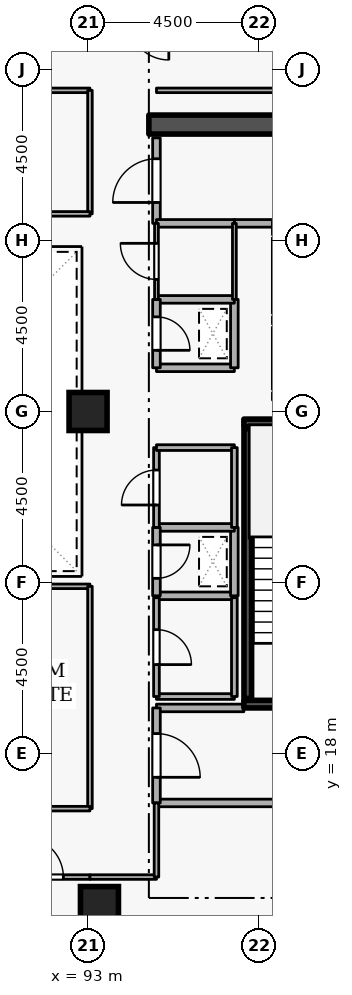
"""IFC4 building model, lengths in metres.
Left out: names, types, materials, properties, quantities, classifications, styles, units other than length and angle.
Written with IfcOpenShell. Run it as: python <this file> out.ifc"""

import sys

from ifc_helpers import new_model, si_unit, direction, frame, frame_2d, origin, origin_2d, place, context, subcontext, project, spatial, rectangle, extrude, element, fill, save


model = new_model("IFC4")
c1 = context("Model", 3, precision=1e-05, world=origin(), true_north=direction((0.0, 1.0)))
c2 = subcontext(c1, "Body", "Model", "MODEL_VIEW")
j1 = project(units=[si_unit("LENGTHUNIT", "METRE"), si_unit("PLANEANGLEUNIT", "RADIAN")], contexts=[c1])
p1 = place(None, origin())
s1 = spatial("IfcSite", under=j1, at=p1, CompositionType="ELEMENT")
p2 = place(p1, origin())
s2 = spatial("IfcBuilding", under=s1, at=p2, CompositionType="ELEMENT")
p3 = place(p2, frame((0.0, 0.0, 236.7)))
s3 = spatial("IfcBuildingStorey", under=s2, at=p3, CompositionType="ELEMENT", Elevation=236.7)
p4 = place(p3, frame((94.6, 34.55, 0.0), z_axis=(0.0, 0.0, 1.0), x_axis=(1.0, 0.0, 0.0)))
e1 = element("IfcWall", 1, at=p4, inside=s3, PredefinedType="SHEAR", context=c2, shape_type="SweptSolid", body=[
    extrude(rectangle(XDim=5.8, YDim=0.5, at=frame_2d((2.9, 0.0))), origin(), (0.0, 0.0, 1.0), 3.6),
])
for number, where, z_axis, x_axis in (
    (2, (93.3, 14.0, 0.0), (0.0, 0.0, 1.0), (1.0, 0.0, 0.0)),
    (3, (93.0, 27.0, 0.0), (0.0, 0.0, 1.0), (1.0, 0.0, 0.0)),
):
    element("IfcColumn", number, at=place(p3, frame(where, z_axis=z_axis, x_axis=x_axis)), inside=s3, PredefinedType="COLUMN", context=c2, shape_type="SweptSolid", body=[
        extrude(rectangle(XDim=1.0, YDim=1.0, at=origin_2d()), origin(), (0.0, 0.0, 1.0), 3.6),
    ])
p5 = place(p3, frame((97.95, 29.22, 0.0), z_axis=(0.0, 0.0, 1.0), x_axis=(0.0, -1.0, 0.0)))
e4 = element("IfcWall", 4, at=p5, inside=s3, PredefinedType="STANDARD", context=c2, shape_type="SweptSolid", body=[
    extrude(rectangle(XDim=1.64, YDim=0.2, at=frame_2d((0.82, 0.0))), origin(), (0.0, 0.0, 1.0), 3.34),
])
p6 = place(p5, frame((0.31, 0.0, 0.0)))
e5 = element("IfcOpeningElement", 5, at=p6, cuts=e4, PredefinedType="OPENING", context=c2, shape_type="SweptSolid", body=[
    extrude(rectangle(XDim=1.02, YDim=2.06, at=frame_2d((0.51, 1.03))), frame((0.0, 0.11, 0.0), z_axis=(0.0, -1.0, 0.0), x_axis=(1.0, 0.0, 0.0)), (0.0, 0.0, 1.0), 0.22),
])
p7 = place(p3, frame((97.95, 31.57, 0.0), z_axis=(0.0, 0.0, 1.0), x_axis=(0.0, -1.0, 0.0)))
e6 = element("IfcWall", 6, at=p7, inside=s3, PredefinedType="STANDARD", context=c2, shape_type="SweptSolid", body=[
    extrude(rectangle(XDim=1.99, YDim=0.2, at=frame_2d((0.995, 0.0))), origin(), (0.0, 0.0, 1.0), 3.34),
])
p8 = place(p7, frame((0.485, 0.0, 0.0)))
e7 = element("IfcOpeningElement", 7, at=p8, cuts=e6, PredefinedType="OPENING", context=c2, shape_type="SweptSolid", body=[
    extrude(rectangle(XDim=1.02, YDim=2.06, at=frame_2d((0.51, 1.03))), frame((0.0, 0.11, 0.0), z_axis=(0.0, -1.0, 0.0), x_axis=(1.0, 0.0, 0.0)), (0.0, 0.0, 1.0), 0.22),
])
p9 = place(p3, frame((100.45, 19.3, 0.0), z_axis=(0.0, 0.0, 1.0), x_axis=(-1.0, 0.0, 0.0)))
e8 = element("IfcWall", 8, at=p9, inside=s3, PredefinedType="SHEAR", context=c2, shape_type="SweptSolid", body=[
    extrude(rectangle(XDim=3.35, YDim=0.2, at=frame_2d((1.675, 0.0))), origin(), (0.0, 0.0, 1.0), 3.6),
])
p10 = place(p9, frame((1.125, 0.0, 0.0)))
e9 = element("IfcOpeningElement", 9, at=p10, cuts=e8, PredefinedType="OPENING", context=c2, shape_type="SweptSolid", body=[
    extrude(rectangle(XDim=1.1, YDim=2.1, at=frame_2d((0.55, 1.05))), frame((0.0, 0.11, 0.0), z_axis=(0.0, -1.0, 0.0), x_axis=(1.0, 0.0, 0.0)), (0.0, 0.0, 1.0), 0.22),
])
p11 = place(p3, frame((97.1, 26.7, 0.0), z_axis=(0.0, 0.0, 1.0), x_axis=(1.0, 0.0, 0.0)))
e10 = element("IfcWall", 10, at=p11, inside=s3, PredefinedType="SHEAR", context=c2, shape_type="SweptSolid", body=[
    extrude(rectangle(XDim=3.35, YDim=0.2, at=frame_2d((1.675, 0.0))), origin(), (0.0, 0.0, 1.0), 3.6),
])
p12 = place(p3, frame((97.203, 26.55, 0.0), z_axis=(0.0, 0.0, 1.0), x_axis=(0.0, -1.0, 0.0)))
e11 = element("IfcWall", 11, at=p12, inside=s3, PredefinedType="SHEAR", context=c2, shape_type="SweptSolid", body=[
    extrude(rectangle(XDim=7.1, YDim=0.2, at=frame_2d((3.55, 0.0))), origin(), (0.0, 0.0, 1.0), 3.6),
])
p13 = place(p3, frame((94.8, 16.7, 0.0), z_axis=(0.0, 0.0, 1.0), x_axis=(1.0, 0.0, 0.0)))
e12 = element("IfcWall", 12, at=p13, inside=s3, PredefinedType="STANDARD", context=c2, shape_type="SweptSolid", body=[
    extrude(rectangle(XDim=5.7, YDim=0.2, at=frame_2d((2.85, 0.0))), origin(), (0.0, 0.0, 1.0), 3.34),
])
p14 = place(p3, frame((97.1, 19.2, 0.0), z_axis=(0.0, 0.0, 1.0), x_axis=(-1.0, 0.0, 0.0)))
e13 = element("IfcWall", 13, at=p14, inside=s3, PredefinedType="STANDARD", context=c2, shape_type="SweptSolid", body=[
    extrude(rectangle(XDim=2.3, YDim=0.2, at=frame_2d((1.15, 0.0))), origin(), (0.0, 0.0, 1.0), 2.545),
])
p15 = place(p3, frame((94.8, 19.2, 0.0), z_axis=(0.0, 0.0, 1.0), x_axis=(0.0, -1.0, 0.0)))
e14 = element("IfcWall", 14, at=p15, inside=s3, PredefinedType="STANDARD", context=c2, shape_type="SweptSolid", body=[
    extrude(rectangle(XDim=2.5, YDim=0.2, at=frame_2d((1.25, 0.0))), origin(), (0.0, 0.0, 1.0), 3.34),
])
p16 = place(p15, frame((0.675, 0.0, 0.0)))
e15 = element("IfcOpeningElement", 15, at=p16, cuts=e14, PredefinedType="OPENING", context=c2, shape_type="SweptSolid", body=[
    extrude(rectangle(XDim=1.15, YDim=2.1, at=frame_2d((0.575, 1.05))), frame((0.0, 0.11, 0.0), z_axis=(0.0, -1.0, 0.0), x_axis=(1.0, 0.0, 0.0)), (0.0, 0.0, 1.0), 0.22),
])
p17 = place(p3, frame((94.8, 28.15, 0.0), z_axis=(0.0, 0.0, 1.0), x_axis=(1.0, 0.0, 0.0)))
e16 = element("IfcWall", 16, at=p17, inside=s3, PredefinedType="STANDARD", context=c2, shape_type="SweptSolid", body=[
    extrude(rectangle(XDim=2.05, YDim=0.2, at=frame_2d((1.025, 0.0))), origin(), (0.0, 0.0, 1.0), 3.34),
])
p18 = place(p3, frame((96.85, 28.15, 0.0), z_axis=(0.0, 0.0, 1.0), x_axis=(0.0, 1.0, 0.0)))
e17 = element("IfcWall", 17, at=p18, inside=s3, PredefinedType="STANDARD", context=c2, shape_type="SweptSolid", body=[
    extrude(rectangle(XDim=1.8, YDim=0.2, at=frame_2d((0.9, 0.0))), origin(), (0.0, 0.0, 1.0), 3.34),
])
p19 = place(p3, frame((96.85, 29.95, 0.0), z_axis=(0.0, 0.0, 1.0), x_axis=(-1.0, 0.0, 0.0)))
e18 = element("IfcWall", 18, at=p19, inside=s3, PredefinedType="STANDARD", context=c2, shape_type="SweptSolid", body=[
    extrude(rectangle(XDim=2.05, YDim=0.2, at=frame_2d((1.025, 0.0))), origin(), (0.0, 0.0, 1.0), 3.34),
])
p20 = place(p3, frame((94.8, 29.95, 0.0), z_axis=(0.0, 0.0, 1.0), x_axis=(0.0, -1.0, 0.0)))
e19 = element("IfcWall", 19, at=p20, inside=s3, PredefinedType="STANDARD", context=c2, shape_type="SweptSolid", body=[
    extrude(rectangle(XDim=1.8, YDim=0.2, at=frame_2d((0.9, 0.0))), origin(), (0.0, 0.0, 1.0), 3.34),
])
p21 = place(p20, frame((0.46, 0.0, 0.0)))
e20 = element("IfcOpeningElement", 20, at=p21, cuts=e19, PredefinedType="OPENING", context=c2, shape_type="SweptSolid", body=[
    extrude(rectangle(XDim=0.88, YDim=2.04, at=frame_2d((0.44, 1.02))), frame((0.0, 0.11, 0.0), z_axis=(0.0, -1.0, 0.0), x_axis=(1.0, 0.0, 0.0)), (0.0, 0.0, 1.0), 0.22),
])
p22 = place(p3, frame((94.8, 22.15, 0.0), z_axis=(0.0, 0.0, 1.0), x_axis=(1.0, 0.0, 0.0)))
e21 = element("IfcWall", 21, at=p22, inside=s3, PredefinedType="STANDARD", context=c2, shape_type="SweptSolid", body=[
    extrude(rectangle(XDim=2.05, YDim=0.2, at=frame_2d((1.025, 0.0))), origin(), (0.0, 0.0, 1.0), 3.34),
])
p23 = place(p3, frame((96.85, 22.15, 0.0), z_axis=(0.0, 0.0, 1.0), x_axis=(0.0, 1.0, 0.0)))
e22 = element("IfcWall", 22, at=p23, inside=s3, PredefinedType="STANDARD", context=c2, shape_type="SweptSolid", body=[
    extrude(rectangle(XDim=1.8, YDim=0.2, at=frame_2d((0.9, 0.0))), origin(), (0.0, 0.0, 1.0), 3.34),
])
p24 = place(p3, frame((96.85, 23.95, 0.0), z_axis=(0.0, 0.0, 1.0), x_axis=(-1.0, 0.0, 0.0)))
e23 = element("IfcWall", 23, at=p24, inside=s3, PredefinedType="STANDARD", context=c2, shape_type="SweptSolid", body=[
    extrude(rectangle(XDim=2.05, YDim=0.2, at=frame_2d((1.025, 0.0))), origin(), (0.0, 0.0, 1.0), 3.34),
])
p25 = place(p3, frame((94.8, 23.95, 0.0), z_axis=(0.0, 0.0, 1.0), x_axis=(0.0, -1.0, 0.0)))
e24 = element("IfcWall", 24, at=p25, inside=s3, PredefinedType="STANDARD", context=c2, shape_type="SweptSolid", body=[
    extrude(rectangle(XDim=1.8, YDim=0.2, at=frame_2d((0.9, 0.0))), origin(), (0.0, 0.0, 1.0), 3.34),
])
p26 = place(p25, frame((0.46, 0.0, 0.0)))
e25 = element("IfcOpeningElement", 25, at=p26, cuts=e24, PredefinedType="OPENING", context=c2, shape_type="SweptSolid", body=[
    extrude(rectangle(XDim=0.88, YDim=2.04, at=frame_2d((0.44, 1.02))), frame((0.0, 0.11, 0.0), z_axis=(0.0, -1.0, 0.0), x_axis=(1.0, 0.0, 0.0)), (0.0, 0.0, 1.0), 0.22),
])
p27 = place(p3, frame((94.8, 31.95, 0.0), z_axis=(0.0, 0.0, 1.0), x_axis=(0.0, 1.0, 0.0)))
e26 = element("IfcWall", 26, at=p27, inside=s3, PredefinedType="STANDARD", context=c2, shape_type="SweptSolid", body=[
    extrude(rectangle(XDim=2.25, YDim=0.2, at=frame_2d((1.125, 0.0))), origin(), (0.0, 0.0, 1.0), 3.34),
])
p28 = place(p27, frame((0.55, 0.0, 0.0)))
e27 = element("IfcOpeningElement", 27, at=p28, cuts=e26, PredefinedType="OPENING", context=c2, shape_type="SweptSolid", body=[
    extrude(rectangle(XDim=1.15, YDim=2.1, at=frame_2d((0.575, 1.05))), frame((0.0, 0.11, 0.0), z_axis=(0.0, -1.0, 0.0), x_axis=(1.0, 0.0, 0.0)), (0.0, 0.0, 1.0), 0.22),
])
p29 = place(p3, frame((97.852, 31.95, 0.0), z_axis=(0.0, 0.0, 1.0), x_axis=(-1.0, 0.0, 0.0)))
e28 = element("IfcWall", 28, at=p29, inside=s3, PredefinedType="STANDARD", context=c2, shape_type="SweptSolid", body=[
    extrude(rectangle(XDim=1.002, YDim=0.2, at=frame_2d((0.501, 0.0))), origin(), (0.0, 0.0, 1.0), 3.34),
])
p30 = place(p3, frame((96.85, 31.95, 0.0), z_axis=(0.0, 0.0, 1.0), x_axis=(-1.0, 0.0, 0.0)))
e29 = element("IfcWall", 29, at=p30, inside=s3, PredefinedType="STANDARD", context=c2, shape_type="SweptSolid", body=[
    extrude(rectangle(XDim=2.05, YDim=0.2, at=frame_2d((1.025, 0.0))), origin(), (0.0, 0.0, 1.0), 3.34),
])
p31 = place(p3, frame((94.8, 19.5, 0.0), z_axis=(0.0, 0.0, 1.0), x_axis=(1.0, 0.0, 0.0)))
e30 = element("IfcWall", 30, at=p31, inside=s3, PredefinedType="PARTITIONING", context=c2, shape_type="SweptSolid", body=[
    extrude(rectangle(XDim=2.05, YDim=0.15, at=frame_2d((1.025, 0.0))), origin(), (0.0, 0.0, 1.0), 2.545),
])
p32 = place(p3, frame((96.85, 19.5, 0.0), z_axis=(0.0, 0.0, 1.0), x_axis=(0.0, 1.0, 0.0)))
e31 = element("IfcWall", 31, at=p32, inside=s3, PredefinedType="PARTITIONING", context=c2, shape_type="SweptSolid", body=[
    extrude(rectangle(XDim=2.6, YDim=0.15, at=frame_2d((1.3, 0.0))), origin(), (0.0, 0.0, 1.0), 3.34),
])
p33 = place(p3, frame((94.8, 22.1, 0.0), z_axis=(0.0, 0.0, 1.0), x_axis=(0.0, -1.0, 0.0)))
e32 = element("IfcWall", 32, at=p33, inside=s3, PredefinedType="PARTITIONING", context=c2, shape_type="SweptSolid", body=[
    extrude(rectangle(XDim=2.6, YDim=0.15, at=frame_2d((1.3, 0.0))), origin(), (0.0, 0.0, 1.0), 3.34),
])
p34 = place(p33, frame((0.84, 0.0, 0.0)))
e33 = element("IfcOpeningElement", 33, at=p34, cuts=e32, PredefinedType="OPENING", context=c2, shape_type="SweptSolid", body=[
    extrude(rectangle(XDim=0.92, YDim=2.08, at=frame_2d((0.46, 1.04))), frame((0.0, 0.085, 0.0), z_axis=(0.0, -1.0, 0.0), x_axis=(1.0, 0.0, 0.0)), (0.0, 0.0, 1.0), 0.17),
])
p35 = place(p3, frame((94.8, 23.95, 0.0), z_axis=(0.0, 0.0, 1.0), x_axis=(0.0, 1.0, 0.0)))
e34 = element("IfcWall", 34, at=p35, inside=s3, PredefinedType="PARTITIONING", context=c2, shape_type="SweptSolid", body=[
    extrude(rectangle(XDim=2.1, YDim=0.15, at=frame_2d((1.05, 0.0))), origin(), (0.0, 0.0, 1.0), 3.34),
])
p36 = place(p35, frame((0.59, 0.0, 0.0)))
e35 = element("IfcOpeningElement", 35, at=p36, cuts=e34, PredefinedType="OPENING", context=c2, shape_type="SweptSolid", body=[
    extrude(rectangle(XDim=0.92, YDim=2.08, at=frame_2d((0.46, 1.04))), frame((0.0, 0.085, 0.0), z_axis=(0.0, -1.0, 0.0), x_axis=(1.0, 0.0, 0.0)), (0.0, 0.0, 1.0), 0.17),
])
p37 = place(p3, frame((94.8, 26.05, 0.0), z_axis=(0.0, 0.0, 1.0), x_axis=(1.0, 0.0, 0.0)))
e36 = element("IfcWall", 36, at=p37, inside=s3, PredefinedType="PARTITIONING", context=c2, shape_type="SweptSolid", body=[
    extrude(rectangle(XDim=2.05, YDim=0.15, at=frame_2d((1.025, 0.0))), origin(), (0.0, 0.0, 1.0), 3.34),
])
p38 = place(p3, frame((96.85, 26.05, 0.0), z_axis=(0.0, 0.0, 1.0), x_axis=(0.0, -1.0, 0.0)))
e37 = element("IfcWall", 37, at=p38, inside=s3, PredefinedType="PARTITIONING", context=c2, shape_type="SweptSolid", body=[
    extrude(rectangle(XDim=2.1, YDim=0.15, at=frame_2d((1.05, 0.0))), origin(), (0.0, 0.0, 1.0), 3.34),
])
p39 = place(p3, frame((94.8, 29.95, 0.0), z_axis=(0.0, 0.0, 1.0), x_axis=(0.0, 1.0, 0.0)))
e38 = element("IfcWall", 38, at=p39, inside=s3, PredefinedType="PARTITIONING", context=c2, shape_type="SweptSolid", body=[
    extrude(rectangle(XDim=2.0, YDim=0.1, at=frame_2d((1.0, 0.0))), origin(), (0.0, 0.0, 1.0), 3.34),
])
p40 = place(p39, frame((0.525, 0.0, 0.0)))
e39 = element("IfcOpeningElement", 39, at=p40, cuts=e38, PredefinedType="OPENING", context=c2, shape_type="SweptSolid", body=[
    extrude(rectangle(XDim=0.95, YDim=2.1, at=frame_2d((0.475, 1.05))), frame((0.0, 0.06, 0.0), z_axis=(0.0, -1.0, 0.0), x_axis=(1.0, 0.0, 0.0)), (0.0, 0.0, 1.0), 0.12),
])
p41 = place(p3, frame((96.85, 31.95, 0.0), z_axis=(0.0, 0.0, 1.0), x_axis=(0.0, -1.0, 0.0)))
e40 = element("IfcWall", 40, at=p41, inside=s3, PredefinedType="PARTITIONING", context=c2, shape_type="SweptSolid", body=[
    extrude(rectangle(XDim=2.0, YDim=0.1, at=frame_2d((1.0, 0.0))), origin(), (0.0, 0.0, 1.0), 3.34),
])
p42 = place(p3, frame((94.8, 35.45, 0.0), z_axis=(0.0, 0.0, 1.0), x_axis=(1.0, 0.0, 0.0)))
e41 = element("IfcWall", 41, at=p42, inside=s3, PredefinedType="PARTITIONING", context=c2, shape_type="SweptSolid", body=[
    extrude(rectangle(XDim=5.9, YDim=0.12, at=frame_2d((2.95, 0.0))), origin(), (0.0, 0.0, 1.0), 3.34),
])
p43 = place(p3, frame((90.6, 14.75, 0.0), z_axis=(0.0, 0.0, 1.0), x_axis=(1.0, 0.0, 0.0)))
e42 = element("IfcWall", 42, at=p43, inside=s3, PredefinedType="PARTITIONING", context=c2, shape_type="SweptSolid", body=[
    extrude(rectangle(XDim=2.45, YDim=0.12, at=frame_2d((1.225, 0.0))), origin(), (0.0, 0.0, 1.0), 3.34),
])
p44 = place(p43, frame((0.7, 0.0, 0.0)))
e43 = element("IfcOpeningElement", 43, at=p44, cuts=e42, PredefinedType="OPENING", context=c2, shape_type="SweptSolid", body=[
    extrude(rectangle(XDim=1.05, YDim=2.1, at=frame_2d((0.525, 1.05))), frame((0.0, 0.07, 0.0), z_axis=(0.0, -1.0, 0.0), x_axis=(1.0, 0.0, 0.0)), (0.0, 0.0, 1.0), 0.14),
])
p45 = place(p3, frame((93.05, 14.75, 0.0), z_axis=(0.0, 0.0, 1.0), x_axis=(1.0, 0.0, 0.0)))
e44 = element("IfcWall", 44, at=p45, inside=s3, PredefinedType="PARTITIONING", context=c2, shape_type="SweptSolid", body=[
    extrude(rectangle(XDim=1.75, YDim=0.12, at=frame_2d((0.875, 0.0))), origin(), (0.0, 0.0, 1.0), 3.34),
])
p46 = place(p3, frame((94.8, 14.75, 0.0), z_axis=(0.0, 0.0, 1.0), x_axis=(0.0, 1.0, 0.0)))
e45 = element("IfcWall", 45, at=p46, inside=s3, PredefinedType="PARTITIONING", context=c2, shape_type="SweptSolid", body=[
    extrude(rectangle(XDim=1.95, YDim=0.12, at=frame_2d((0.975, 0.0))), origin(), (0.0, 0.0, 1.0), 3.34),
])
p47 = place(p3, frame((83.95, 22.4, 0.0), z_axis=(0.0, 0.0, 1.0), x_axis=(1.0, 0.0, 0.0)))
e46 = element("IfcWall", 46, at=p47, inside=s3, PredefinedType="PARTITIONING", context=c2, shape_type="SweptSolid", body=[
    extrude(rectangle(XDim=9.1, YDim=0.12, at=frame_2d((4.55, 0.0))), origin(), (0.0, 0.0, 1.0), 3.34),
])
p48 = place(p3, frame((93.05, 22.4, 0.0), z_axis=(0.0, 0.0, 1.0), x_axis=(0.0, -1.0, 0.0)))
e47 = element("IfcWall", 47, at=p48, inside=s3, PredefinedType="PARTITIONING", context=c2, shape_type="SweptSolid", body=[
    extrude(rectangle(XDim=5.85, YDim=0.12, at=frame_2d((2.925, 0.0))), origin(), (0.0, 0.0, 1.0), 3.34),
])
p49 = place(p3, frame((93.05, 16.55, 0.0), z_axis=(0.0, 0.0, 1.0), x_axis=(-1.0, 0.0, 0.0)))
e48 = element("IfcWall", 48, at=p49, inside=s3, PredefinedType="PARTITIONING", context=c2, shape_type="SweptSolid", body=[
    extrude(rectangle(XDim=9.1, YDim=0.12, at=frame_2d((4.55, 0.0))), origin(), (0.0, 0.0, 1.0), 3.34),
])
p50 = place(p49, frame((4.075, 0.0, 0.0)))
e49 = element("IfcOpeningElement", 49, at=p50, cuts=e48, PredefinedType="OPENING", context=c2, shape_type="SweptSolid", body=[
    extrude(rectangle(XDim=0.95, YDim=2.1, at=frame_2d((0.475, 1.05))), frame((0.0, 0.07, 0.0), z_axis=(0.0, -1.0, 0.0), x_axis=(1.0, 0.0, 0.0)), (0.0, 0.0, 1.0), 0.14),
])
p51 = place(p3, frame((83.95, 35.45, 0.0), z_axis=(0.0, 0.0, 1.0), x_axis=(1.0, 0.0, 0.0)))
e50 = element("IfcWall", 50, at=p51, inside=s3, PredefinedType="PARTITIONING", context=c2, shape_type="SweptSolid", body=[
    extrude(rectangle(XDim=9.1, YDim=0.12, at=frame_2d((4.55, 0.0))), origin(), (0.0, 0.0, 1.0), 3.34),
])
p52 = place(p51, frame((4.075, 0.0, 0.0)))
e51 = element("IfcOpeningElement", 51, at=p52, cuts=e50, PredefinedType="OPENING", context=c2, shape_type="SweptSolid", body=[
    extrude(rectangle(XDim=0.95, YDim=2.1, at=frame_2d((0.475, 1.05))), frame((0.0, 0.07, 0.0), z_axis=(0.0, -1.0, 0.0), x_axis=(1.0, 0.0, 0.0)), (0.0, 0.0, 1.0), 0.14),
])
p53 = place(p3, frame((93.05, 35.45, 0.0), z_axis=(0.0, 0.0, 1.0), x_axis=(0.0, -1.0, 0.0)))
e52 = element("IfcWall", 52, at=p53, inside=s3, PredefinedType="PARTITIONING", context=c2, shape_type="SweptSolid", body=[
    extrude(rectangle(XDim=3.25, YDim=0.12, at=frame_2d((1.625, 0.0))), origin(), (0.0, 0.0, 1.0), 3.34),
])
p54 = place(p3, frame((93.05, 32.2, 0.0), z_axis=(0.0, 0.0, 1.0), x_axis=(-1.0, 0.0, 0.0)))
e53 = element("IfcWall", 53, at=p54, inside=s3, PredefinedType="PARTITIONING", context=c2, shape_type="SweptSolid", body=[
    extrude(rectangle(XDim=9.1, YDim=0.12, at=frame_2d((4.55, 0.0))), origin(), (0.0, 0.0, 1.0), 3.34),
])
p55 = place(p16, origin())
e54 = element("IfcDoor", 54, at=p55, inside=s3, OperationType="SINGLE_SWING_RIGHT", PredefinedType="DOOR", context=c2, shape_type="SweptSolid", body=[
    extrude(rectangle(XDim=1.15, YDim=2.1, at=frame_2d((0.575, 1.05))), frame((0.0, 0.025, 0.0), z_axis=(0.0, -1.0, 0.0), x_axis=(1.0, 0.0, 0.0)), (0.0, 0.0, 1.0), 0.05),
])
fill(e15, e54)
p56 = place(p21, origin())
e55 = element("IfcDoor", 55, at=p56, inside=s3, OperationType="SINGLE_SWING_RIGHT", PredefinedType="DOOR", context=c2, shape_type="SweptSolid", body=[
    extrude(rectangle(XDim=0.88, YDim=2.04, at=frame_2d((0.44, 1.02))), frame((0.0, 0.025, 0.0), z_axis=(0.0, -1.0, 0.0), x_axis=(1.0, 0.0, 0.0)), (0.0, 0.0, 1.0), 0.05),
])
fill(e20, e55)
p57 = place(p26, origin())
e56 = element("IfcDoor", 56, at=p57, inside=s3, OperationType="SINGLE_SWING_LEFT", PredefinedType="DOOR", context=c2, shape_type="SweptSolid", body=[
    extrude(rectangle(XDim=0.88, YDim=2.04, at=frame_2d((0.44, 1.02))), frame((0.0, 0.025, 0.0), z_axis=(0.0, -1.0, 0.0), x_axis=(1.0, 0.0, 0.0)), (0.0, 0.0, 1.0), 0.05),
])
fill(e25, e56)
p58 = place(p34, origin())
e57 = element("IfcDoor", 57, at=p58, inside=s3, OperationType="SINGLE_SWING_RIGHT", PredefinedType="DOOR", context=c2, shape_type="SweptSolid", body=[
    extrude(rectangle(XDim=0.92, YDim=2.08, at=frame_2d((0.46, 1.04))), frame((0.0, 0.025, 0.0), z_axis=(0.0, -1.0, 0.0), x_axis=(1.0, 0.0, 0.0)), (0.0, 0.0, 1.0), 0.05),
])
fill(e33, e57)
p59 = place(p36, origin())
e58 = element("IfcDoor", 58, at=p59, inside=s3, OperationType="SINGLE_SWING_LEFT", PredefinedType="DOOR", context=c2, shape_type="SweptSolid", body=[
    extrude(rectangle(XDim=0.92, YDim=2.08, at=frame_2d((0.46, 1.04))), frame((0.0, 0.025, 0.0), z_axis=(0.0, -1.0, 0.0), x_axis=(1.0, 0.0, 0.0)), (0.0, 0.0, 1.0), 0.05),
])
fill(e35, e58)
p60 = place(p40, origin())
e59 = element("IfcDoor", 59, at=p60, inside=s3, OperationType="SINGLE_SWING_RIGHT", PredefinedType="DOOR", context=c2, shape_type="SweptSolid", body=[
    extrude(rectangle(XDim=0.95, YDim=2.1, at=frame_2d((0.475, 1.05))), frame((0.0, 0.025, 0.0), z_axis=(0.0, -1.0, 0.0), x_axis=(1.0, 0.0, 0.0)), (0.0, 0.0, 1.0), 0.05),
])
fill(e39, e59)
p61 = place(p28, origin())
e60 = element("IfcDoor", 60, at=p61, inside=s3, OperationType="SINGLE_SWING_LEFT", PredefinedType="DOOR", context=c2, shape_type="SweptSolid", body=[
    extrude(rectangle(XDim=1.15, YDim=2.1, at=frame_2d((0.575, 1.05))), frame((0.0, 0.025, 0.0), z_axis=(0.0, -1.0, 0.0), x_axis=(1.0, 0.0, 0.0)), (0.0, 0.0, 1.0), 0.05),
])
fill(e27, e60)
p62 = place(p44, origin())
e61 = element("IfcDoor", 61, at=p62, inside=s3, OperationType="SINGLE_SWING_LEFT", PredefinedType="DOOR", context=c2, shape_type="SweptSolid", body=[
    extrude(rectangle(XDim=1.05, YDim=2.1, at=frame_2d((0.525, 1.05))), frame((0.0, 0.025, 0.0), z_axis=(0.0, -1.0, 0.0), x_axis=(1.0, 0.0, 0.0)), (0.0, 0.0, 1.0), 0.05),
])
fill(e43, e61)
save(model, sys.argv[1])
